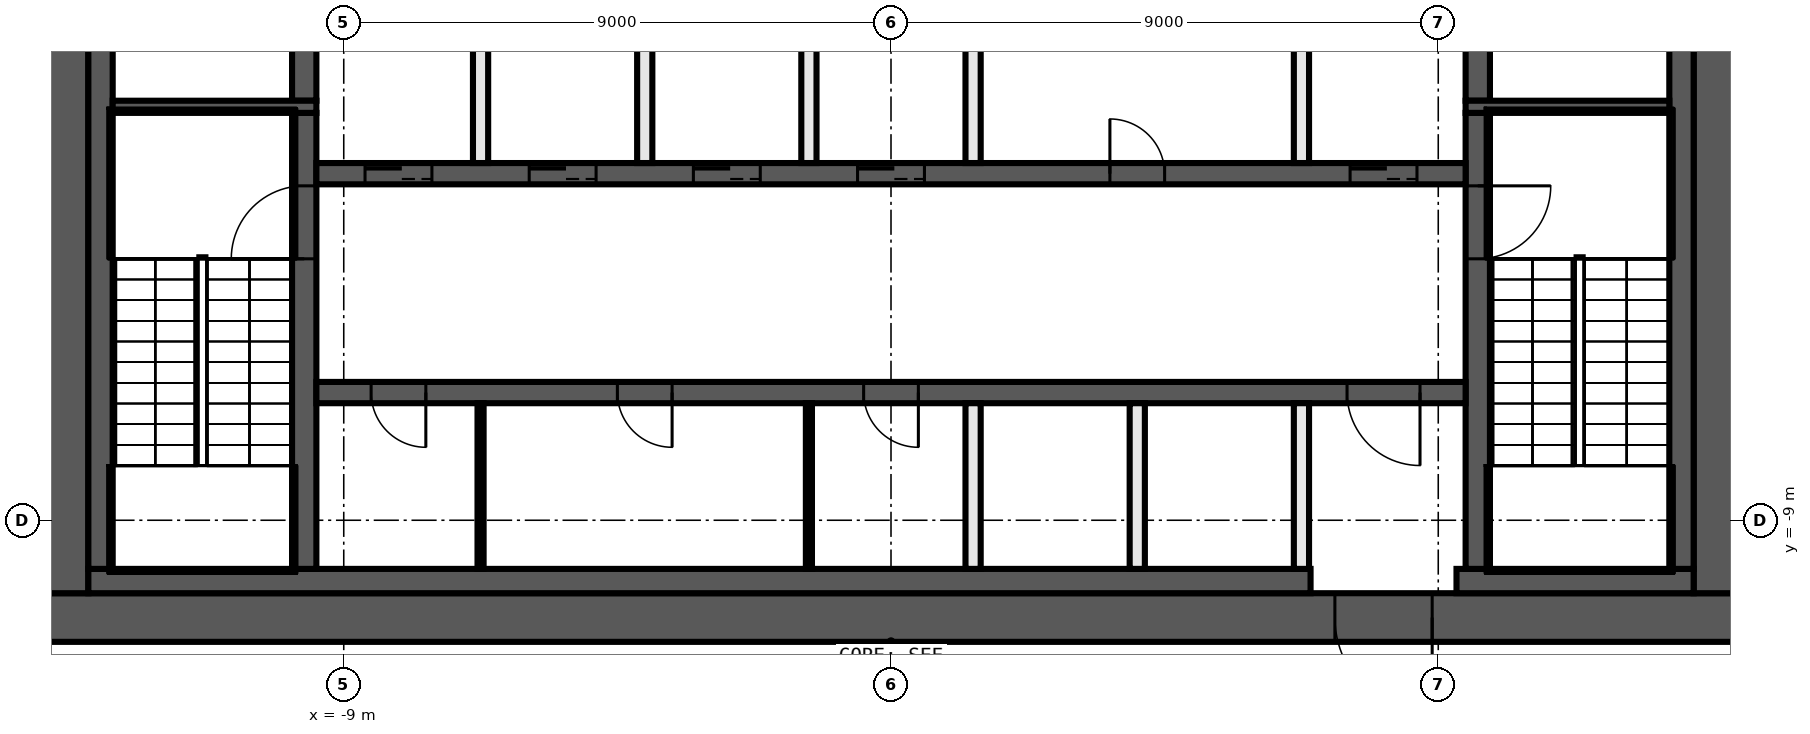
"""IFC4 building model, lengths in metres.
Left out: names, types, materials, properties, quantities, classifications, styles, units other than length and angle.
Written with IfcOpenShell. Run it as: python <this file> out.ifc"""

import sys

from ifc_helpers import new_model, si_unit, direction, frame, frame_2d, origin, place, context, subcontext, project, spatial, rectangle, extrude, element, fill, save


model = new_model("IFC4")
c1 = context("Model", 3, precision=1e-05, world=origin(), true_north=direction((0.0, 1.0)))
c2 = subcontext(c1, "Body", "Model", "MODEL_VIEW")
j1 = project(units=[si_unit("LENGTHUNIT", "METRE"), si_unit("PLANEANGLEUNIT", "RADIAN")], contexts=[c1])
p1 = place(None, origin())
s1 = spatial("IfcSite", under=j1, at=p1, CompositionType="ELEMENT")
p2 = place(p1, origin())
s2 = spatial("IfcBuilding", under=s1, at=p2, CompositionType="ELEMENT")
p3 = place(p2, frame((0.0, 0.0, 183.8)))
s3 = spatial("IfcBuildingStorey", under=s2, at=p3, CompositionType="ELEMENT", Elevation=183.8)
p4 = place(p3, frame((14.0, -10.6, 0.0), z_axis=(0.0, 0.0, 1.0), x_axis=(-1.0, 0.0, 0.0)))
e1 = element("IfcWall", 1, at=p4, inside=s3, PredefinedType="SHEAR", context=c2, shape_type="SweptSolid", body=[
    extrude(rectangle(XDim=28.0, YDim=0.8, at=frame_2d((14.0, 0.0))), origin(), (0.0, 0.0, 1.0), 14.62),
])
p5 = place(p4, frame((5.1, 0.0, 0.0)))
e2 = element("IfcOpeningElement", 2, at=p5, cuts=e1, PredefinedType="OPENING", context=c2, shape_type="SweptSolid", body=[
    extrude(rectangle(XDim=1.6, YDim=2.1, at=frame_2d((0.8, 1.05))), frame((0.0, 0.41, 0.0), z_axis=(0.0, -1.0, 0.0), x_axis=(1.0, 0.0, 0.0)), (0.0, 0.0, 1.0), 0.82),
])
for number, where, z_axis, x_axis in (
    (3, (13.6, 10.2, 0.0), (0.0, 0.0, 1.0), (0.0, -1.0, 0.0)),
    (4, (-13.6, -10.2, 0.0), (0.0, 0.0, 1.0), (0.0, 1.0, 0.0)),
):
    element("IfcWall", number, at=place(p3, frame(where, z_axis=z_axis, x_axis=x_axis)), inside=s3, PredefinedType="SHEAR", context=c2, shape_type="SweptSolid", body=[
        extrude(rectangle(XDim=20.4, YDim=0.8, at=frame_2d((10.2, 0.0))), origin(), (0.0, 0.0, 1.0), 14.62),
    ])
p6 = place(p3, frame((13.2, -10.0, 0.0), z_axis=(0.0, 0.0, 1.0), x_axis=(-1.0, 0.0, 0.0)))
e5 = element("IfcWall", 5, at=p6, inside=s3, PredefinedType="SHEAR", context=c2, shape_type="SweptSolid", body=[
    extrude(rectangle(XDim=3.9, YDim=0.4, at=frame_2d((1.95, 0.0))), origin(), (0.0, 0.0, 1.0), 14.62),
])
p7 = place(p3, frame((6.9, -10.0, 0.0), z_axis=(0.0, 0.0, 1.0), x_axis=(-1.0, 0.0, 0.0)))
e6 = element("IfcWall", 6, at=p7, inside=s3, PredefinedType="SHEAR", context=c2, shape_type="SweptSolid", body=[
    extrude(rectangle(XDim=20.1, YDim=0.4, at=frame_2d((10.05, 0.0))), origin(), (0.0, 0.0, 1.0), 14.62),
])
for number, where, z_axis, x_axis in (
    (7, (13.0, 9.8, 0.0), (0.0, 0.0, 1.0), (0.0, -1.0, 0.0)),
    (8, (-13.0, -9.8, 0.0), (0.0, 0.0, 1.0), (0.0, 1.0, 0.0)),
):
    element("IfcWall", number, at=place(p3, frame(where, z_axis=z_axis, x_axis=x_axis)), inside=s3, PredefinedType="SHEAR", context=c2, shape_type="SweptSolid", body=[
        extrude(rectangle(XDim=19.6, YDim=0.4, at=frame_2d((9.8, 0.0))), origin(), (0.0, 0.0, 1.0), 14.62),
    ])
p8 = place(p3, frame((9.65, -2.3, 0.0), z_axis=(0.0, 0.0, 1.0), x_axis=(0.0, -1.0, 0.0)))
e9 = element("IfcWall", 9, at=p8, inside=s3, PredefinedType="SHEAR", context=c2, shape_type="SweptSolid", body=[
    extrude(rectangle(XDim=7.5, YDim=0.4, at=frame_2d((3.75, 0.0))), origin(), (0.0, 0.0, 1.0), 14.62),
])
p9 = place(p8, frame((1.2, 0.0, 0.0)))
e10 = element("IfcOpeningElement", 10, at=p9, cuts=e9, PredefinedType="OPENING", context=c2, shape_type="SweptSolid", body=[
    extrude(rectangle(XDim=1.2, YDim=2.1, at=frame_2d((0.6, 1.05))), frame((0.0, 0.21, 0.0), z_axis=(0.0, -1.0, 0.0), x_axis=(1.0, 0.0, 0.0)), (0.0, 0.0, 1.0), 0.42),
])
p10 = place(p3, frame((9.65, 2.1, 0.0), z_axis=(0.0, 0.0, 1.0), x_axis=(0.0, -1.0, 0.0)))
e11 = element("IfcWall", 11, at=p10, inside=s3, PredefinedType="SHEAR", context=c2, shape_type="SweptSolid", body=[
    extrude(rectangle(XDim=4.2, YDim=0.4, at=frame_2d((2.1, 0.0))), origin(), (0.0, 0.0, 1.0), 14.62),
])
p11 = place(p10, frame((0.15, 0.0, 0.0)))
e12 = element("IfcOpeningElement", 12, at=p11, cuts=e11, PredefinedType="OPENING", context=c2, shape_type="SweptSolid", body=[
    extrude(rectangle(XDim=0.9, YDim=2.1, at=frame_2d((0.45, 1.05))), frame((0.0, 0.21, 0.0), z_axis=(0.0, -1.0, 0.0), x_axis=(1.0, 0.0, 0.0)), (0.0, 0.0, 1.0), 0.42),
])
p12 = place(p3, frame((-9.65, -9.8, 0.0), z_axis=(0.0, 0.0, 1.0), x_axis=(0.0, 1.0, 0.0)))
e13 = element("IfcWall", 13, at=p12, inside=s3, PredefinedType="SHEAR", context=c2, shape_type="SweptSolid", body=[
    extrude(rectangle(XDim=7.5, YDim=0.4, at=frame_2d((3.75, 0.0))), origin(), (0.0, 0.0, 1.0), 14.62),
])
p13 = place(p12, frame((5.1, 0.0, 0.0)))
e14 = element("IfcOpeningElement", 14, at=p13, cuts=e13, PredefinedType="OPENING", context=c2, shape_type="SweptSolid", body=[
    extrude(rectangle(XDim=1.2, YDim=2.1, at=frame_2d((0.6, 1.05))), frame((0.0, 0.21, 0.0), z_axis=(0.0, -1.0, 0.0), x_axis=(1.0, 0.0, 0.0)), (0.0, 0.0, 1.0), 0.42),
])
p14 = place(p3, frame((-9.65, -2.1, 0.0), z_axis=(0.0, 0.0, 1.0), x_axis=(0.0, 1.0, 0.0)))
e15 = element("IfcWall", 15, at=p14, inside=s3, PredefinedType="SHEAR", context=c2, shape_type="SweptSolid", body=[
    extrude(rectangle(XDim=4.2, YDim=0.4, at=frame_2d((2.1, 0.0))), origin(), (0.0, 0.0, 1.0), 14.62),
])
for number, where, z_axis, x_axis in (
    (16, (9.45, -2.2, 0.0), (0.0, 0.0, 1.0), (1.0, 0.0, 0.0)),
    (17, (-9.45, -2.2, 0.0), (0.0, 0.0, 1.0), (-1.0, 0.0, 0.0)),
):
    element("IfcWall", number, at=place(p3, frame(where, z_axis=z_axis, x_axis=x_axis)), inside=s3, PredefinedType="SHEAR", context=c2, shape_type="SweptSolid", body=[
        extrude(rectangle(XDim=3.35, YDim=0.2, at=frame_2d((1.675, 0.0))), origin(), (0.0, 0.0, 1.0), 14.62),
    ])
p15 = place(p3, frame((-9.45, -3.3, 0.0), z_axis=(0.0, 0.0, 1.0), x_axis=(1.0, 0.0, 0.0)))
e18 = element("IfcWall", 18, at=p15, inside=s3, PredefinedType="SHEAR", context=c2, shape_type="SweptSolid", body=[
    extrude(rectangle(XDim=18.9, YDim=0.35, at=frame_2d((9.45, 0.0))), origin(), (0.0, 0.0, 1.0), 14.62),
])
p16 = place(p15, frame((0.8, 0.0, 0.0)))
e19 = element("IfcOpeningElement", 19, at=p16, cuts=e18, PredefinedType="OPENING", context=c2, shape_type="SweptSolid", body=[
    extrude(rectangle(XDim=1.1, YDim=2.1, at=frame_2d((0.55, 1.05))), frame((0.0, 0.185, 0.0), z_axis=(0.0, -1.0, 0.0), x_axis=(1.0, 0.0, 0.0)), (0.0, 0.0, 1.0), 0.37),
])
p17 = place(p15, frame((3.5, 0.0, 0.0)))
e20 = element("IfcOpeningElement", 20, at=p17, cuts=e18, PredefinedType="OPENING", context=c2, shape_type="SweptSolid", body=[
    extrude(rectangle(XDim=1.1, YDim=2.1, at=frame_2d((0.55, 1.05))), frame((0.0, 0.185, 0.0), z_axis=(0.0, -1.0, 0.0), x_axis=(1.0, 0.0, 0.0)), (0.0, 0.0, 1.0), 0.37),
])
p18 = place(p15, frame((6.2, 0.0, 0.0)))
e21 = element("IfcOpeningElement", 21, at=p18, cuts=e18, PredefinedType="OPENING", context=c2, shape_type="SweptSolid", body=[
    extrude(rectangle(XDim=1.1, YDim=2.1, at=frame_2d((0.55, 1.05))), frame((0.0, 0.185, 0.0), z_axis=(0.0, -1.0, 0.0), x_axis=(1.0, 0.0, 0.0)), (0.0, 0.0, 1.0), 0.37),
])
p19 = place(p15, frame((8.9, 0.0, 0.0)))
e22 = element("IfcOpeningElement", 22, at=p19, cuts=e18, PredefinedType="OPENING", context=c2, shape_type="SweptSolid", body=[
    extrude(rectangle(XDim=1.1, YDim=2.1, at=frame_2d((0.55, 1.05))), frame((0.0, 0.185, 0.0), z_axis=(0.0, -1.0, 0.0), x_axis=(1.0, 0.0, 0.0)), (0.0, 0.0, 1.0), 0.37),
])
p20 = place(p15, frame((17.0, 0.0, 0.0)))
e23 = element("IfcOpeningElement", 23, at=p20, cuts=e18, PredefinedType="OPENING", context=c2, shape_type="SweptSolid", body=[
    extrude(rectangle(XDim=1.1, YDim=2.1, at=frame_2d((0.55, 1.05))), frame((0.0, 0.185, 0.0), z_axis=(0.0, -1.0, 0.0), x_axis=(1.0, 0.0, 0.0)), (0.0, 0.0, 1.0), 0.37),
])
p21 = place(p15, frame((13.05, 0.0, 0.0)))
e24 = element("IfcOpeningElement", 24, at=p21, cuts=e18, PredefinedType="OPENING", context=c2, shape_type="SweptSolid", body=[
    extrude(rectangle(XDim=0.9, YDim=2.1, at=frame_2d((0.45, 1.05))), frame((0.0, 0.185, 0.0), z_axis=(0.0, -1.0, 0.0), x_axis=(1.0, 0.0, 0.0)), (0.0, 0.0, 1.0), 0.37),
])
p22 = place(p3, frame((9.45, -6.9, 0.0), z_axis=(0.0, 0.0, 1.0), x_axis=(-1.0, 0.0, 0.0)))
e25 = element("IfcWall", 25, at=p22, inside=s3, PredefinedType="SHEAR", context=c2, shape_type="SweptSolid", body=[
    extrude(rectangle(XDim=18.9, YDim=0.35, at=frame_2d((9.45, 0.0))), origin(), (0.0, 0.0, 1.0), 14.62),
])
p23 = place(p22, frame((0.75, 0.0, 0.0)))
e26 = element("IfcOpeningElement", 26, at=p23, cuts=e25, PredefinedType="OPENING", context=c2, shape_type="SweptSolid", body=[
    extrude(rectangle(XDim=1.2, YDim=2.1, at=frame_2d((0.6, 1.05))), frame((0.0, 0.185, 0.0), z_axis=(0.0, -1.0, 0.0), x_axis=(1.0, 0.0, 0.0)), (0.0, 0.0, 1.0), 0.37),
])
p24 = place(p22, frame((17.1, 0.0, 0.0)))
e27 = element("IfcOpeningElement", 27, at=p24, cuts=e25, PredefinedType="OPENING", context=c2, shape_type="SweptSolid", body=[
    extrude(rectangle(XDim=0.9, YDim=2.1, at=frame_2d((0.45, 1.05))), frame((0.0, 0.185, 0.0), z_axis=(0.0, -1.0, 0.0), x_axis=(1.0, 0.0, 0.0)), (0.0, 0.0, 1.0), 0.37),
])
p25 = place(p22, frame((13.05, 0.0, 0.0)))
e28 = element("IfcOpeningElement", 28, at=p25, cuts=e25, PredefinedType="OPENING", context=c2, shape_type="SweptSolid", body=[
    extrude(rectangle(XDim=0.9, YDim=2.1, at=frame_2d((0.45, 1.05))), frame((0.0, 0.185, 0.0), z_axis=(0.0, -1.0, 0.0), x_axis=(1.0, 0.0, 0.0)), (0.0, 0.0, 1.0), 0.37),
])
p26 = place(p22, frame((9.0, 0.0, 0.0)))
e29 = element("IfcOpeningElement", 29, at=p26, cuts=e25, PredefinedType="OPENING", context=c2, shape_type="SweptSolid", body=[
    extrude(rectangle(XDim=0.9, YDim=2.1, at=frame_2d((0.45, 1.05))), frame((0.0, 0.185, 0.0), z_axis=(0.0, -1.0, 0.0), x_axis=(1.0, 0.0, 0.0)), (0.0, 0.0, 1.0), 0.37),
])
for number, where, z_axis, x_axis in (
    (30, (6.75, -9.8, 0.0), (0.0, 0.0, 1.0), (0.0, 1.0, 0.0)),
    (31, (6.75, -3.125, 0.0), (0.0, 0.0, 1.0), (0.0, 1.0, 0.0)),
    (32, (4.05, -9.8, 0.0), (0.0, 0.0, 1.0), (0.0, 1.0, 0.0)),
    (33, (1.35, -9.8, 0.0), (0.0, 0.0, 1.0), (0.0, 1.0, 0.0)),
    (34, (1.35, -3.125, 0.0), (0.0, 0.0, 1.0), (0.0, 1.0, 0.0)),
):
    element("IfcWall", number, at=place(p3, frame(where, z_axis=z_axis, x_axis=x_axis)), inside=s3, PredefinedType="SOLIDWALL", context=c2, shape_type="SweptSolid", body=[
        extrude(rectangle(XDim=2.725, YDim=0.25, at=frame_2d((1.363, 0.0))), origin(), (0.0, 0.0, 1.0), 14.62),
    ])
p27 = place(p3, frame((-1.35, -9.8, 0.0), z_axis=(0.0, 0.0, 1.0), x_axis=(0.0, 1.0, 0.0)))
e35 = element("IfcWall", 35, at=p27, inside=s3, PredefinedType="PARTITIONING", context=c2, shape_type="SweptSolid", body=[
    extrude(rectangle(XDim=2.725, YDim=0.1, at=frame_2d((1.363, 0.0))), origin(), (0.0, 0.0, 1.0), 14.62),
])
for number, where, z_axis, x_axis in (
    (36, (-1.35, -3.125, 0.0), (0.0, 0.0, 1.0), (0.0, 1.0, 0.0)),
    (37, (-4.05, -3.125, 0.0), (0.0, 0.0, 1.0), (0.0, 1.0, 0.0)),
):
    element("IfcWall", number, at=place(p3, frame(where, z_axis=z_axis, x_axis=x_axis)), inside=s3, PredefinedType="SOLIDWALL", context=c2, shape_type="SweptSolid", body=[
        extrude(rectangle(XDim=2.725, YDim=0.25, at=frame_2d((1.363, 0.0))), origin(), (0.0, 0.0, 1.0), 14.62),
    ])
p28 = place(p3, frame((-6.75, -9.8, 0.0), z_axis=(0.0, 0.0, 1.0), x_axis=(0.0, 1.0, 0.0)))
e38 = element("IfcWall", 38, at=p28, inside=s3, PredefinedType="PARTITIONING", context=c2, shape_type="SweptSolid", body=[
    extrude(rectangle(XDim=2.725, YDim=0.1, at=frame_2d((1.363, 0.0))), origin(), (0.0, 0.0, 1.0), 14.62),
])
p29 = place(p3, frame((-6.75, -3.125, 0.0), z_axis=(0.0, 0.0, 1.0), x_axis=(0.0, 1.0, 0.0)))
e39 = element("IfcWall", 39, at=p29, inside=s3, PredefinedType="SOLIDWALL", context=c2, shape_type="SweptSolid", body=[
    extrude(rectangle(XDim=2.725, YDim=0.25, at=frame_2d((1.363, 0.0))), origin(), (0.0, 0.0, 1.0), 14.62),
])
p30 = place(p16, origin())
e40 = element("IfcDoor", 40, at=p30, inside=s3, OperationType="DOUBLE_DOOR_SLIDING", PredefinedType="DOOR", context=c2, shape_type="SweptSolid", body=[
    extrude(rectangle(XDim=1.1, YDim=2.1, at=frame_2d((0.55, 1.05))), frame((0.0, 0.025, 0.0), z_axis=(0.0, -1.0, 0.0), x_axis=(1.0, 0.0, 0.0)), (0.0, 0.0, 1.0), 0.05),
])
fill(e19, e40)
p31 = place(p17, origin())
e41 = element("IfcDoor", 41, at=p31, inside=s3, OperationType="DOUBLE_DOOR_SLIDING", PredefinedType="DOOR", context=c2, shape_type="SweptSolid", body=[
    extrude(rectangle(XDim=1.1, YDim=2.1, at=frame_2d((0.55, 1.05))), frame((0.0, 0.025, 0.0), z_axis=(0.0, -1.0, 0.0), x_axis=(1.0, 0.0, 0.0)), (0.0, 0.0, 1.0), 0.05),
])
fill(e20, e41)
p32 = place(p18, origin())
e42 = element("IfcDoor", 42, at=p32, inside=s3, OperationType="DOUBLE_DOOR_SLIDING", PredefinedType="DOOR", context=c2, shape_type="SweptSolid", body=[
    extrude(rectangle(XDim=1.1, YDim=2.1, at=frame_2d((0.55, 1.05))), frame((0.0, 0.025, 0.0), z_axis=(0.0, -1.0, 0.0), x_axis=(1.0, 0.0, 0.0)), (0.0, 0.0, 1.0), 0.05),
])
fill(e21, e42)
p33 = place(p19, origin())
e43 = element("IfcDoor", 43, at=p33, inside=s3, OperationType="DOUBLE_DOOR_SLIDING", PredefinedType="DOOR", context=c2, shape_type="SweptSolid", body=[
    extrude(rectangle(XDim=1.1, YDim=2.1, at=frame_2d((0.55, 1.05))), frame((0.0, 0.025, 0.0), z_axis=(0.0, -1.0, 0.0), x_axis=(1.0, 0.0, 0.0)), (0.0, 0.0, 1.0), 0.05),
])
fill(e22, e43)
p34 = place(p20, origin())
e44 = element("IfcDoor", 44, at=p34, inside=s3, OperationType="DOUBLE_DOOR_SLIDING", PredefinedType="DOOR", context=c2, shape_type="SweptSolid", body=[
    extrude(rectangle(XDim=1.1, YDim=2.1, at=frame_2d((0.55, 1.05))), frame((0.0, 0.025, 0.0), z_axis=(0.0, -1.0, 0.0), x_axis=(1.0, 0.0, 0.0)), (0.0, 0.0, 1.0), 0.05),
])
fill(e23, e44)
p35 = place(p5, origin())
e45 = element("IfcDoor", 45, at=p35, inside=s3, OperationType="DOUBLE_DOOR_SINGLE_SWING", PredefinedType="DOOR", context=c2, shape_type="SweptSolid", body=[
    extrude(rectangle(XDim=1.6, YDim=2.1, at=frame_2d((0.8, 1.05))), frame((0.0, 0.025, 0.0), z_axis=(0.0, -1.0, 0.0), x_axis=(1.0, 0.0, 0.0)), (0.0, 0.0, 1.0), 0.05),
])
fill(e2, e45)
p36 = place(p23, origin())
e46 = element("IfcDoor", 46, at=p36, inside=s3, OperationType="SINGLE_SWING_LEFT", PredefinedType="DOOR", context=c2, shape_type="SweptSolid", body=[
    extrude(rectangle(XDim=1.2, YDim=2.1, at=frame_2d((0.6, 1.05))), frame((0.0, 0.025, 0.0), z_axis=(0.0, -1.0, 0.0), x_axis=(1.0, 0.0, 0.0)), (0.0, 0.0, 1.0), 0.05),
])
fill(e26, e46)
p37 = place(p21, origin())
e47 = element("IfcDoor", 47, at=p37, inside=s3, OperationType="SINGLE_SWING_LEFT", PredefinedType="DOOR", context=c2, shape_type="SweptSolid", body=[
    extrude(rectangle(XDim=0.9, YDim=2.1, at=frame_2d((0.45, 1.05))), frame((0.0, 0.025, 0.0), z_axis=(0.0, -1.0, 0.0), x_axis=(1.0, 0.0, 0.0)), (0.0, 0.0, 1.0), 0.05),
])
fill(e24, e47)
p38 = place(p24, origin())
e48 = element("IfcDoor", 48, at=p38, inside=s3, OperationType="SINGLE_SWING_RIGHT", PredefinedType="DOOR", context=c2, shape_type="SweptSolid", body=[
    extrude(rectangle(XDim=0.9, YDim=2.1, at=frame_2d((0.45, 1.05))), frame((0.0, 0.025, 0.0), z_axis=(0.0, -1.0, 0.0), x_axis=(1.0, 0.0, 0.0)), (0.0, 0.0, 1.0), 0.05),
])
fill(e27, e48)
p39 = place(p25, origin())
e49 = element("IfcDoor", 49, at=p39, inside=s3, OperationType="SINGLE_SWING_LEFT", PredefinedType="DOOR", context=c2, shape_type="SweptSolid", body=[
    extrude(rectangle(XDim=0.9, YDim=2.1, at=frame_2d((0.45, 1.05))), frame((0.0, 0.025, 0.0), z_axis=(0.0, -1.0, 0.0), x_axis=(1.0, 0.0, 0.0)), (0.0, 0.0, 1.0), 0.05),
])
fill(e28, e49)
p40 = place(p26, origin())
e50 = element("IfcDoor", 50, at=p40, inside=s3, OperationType="SINGLE_SWING_RIGHT", PredefinedType="DOOR", context=c2, shape_type="SweptSolid", body=[
    extrude(rectangle(XDim=0.9, YDim=2.1, at=frame_2d((0.45, 1.05))), frame((0.0, 0.025, 0.0), z_axis=(0.0, -1.0, 0.0), x_axis=(1.0, 0.0, 0.0)), (0.0, 0.0, 1.0), 0.05),
])
fill(e29, e50)
p41 = place(p9, origin())
e51 = element("IfcDoor", 51, at=p41, inside=s3, OperationType="SINGLE_SWING_RIGHT", PredefinedType="DOOR", context=c2, shape_type="SweptSolid", body=[
    extrude(rectangle(XDim=1.2, YDim=2.1, at=frame_2d((0.6, 1.05))), frame((0.0, 0.025, 0.0), z_axis=(0.0, -1.0, 0.0), x_axis=(1.0, 0.0, 0.0)), (0.0, 0.0, 1.0), 0.05),
])
fill(e10, e51)
p42 = place(p13, origin())
e52 = element("IfcDoor", 52, at=p42, inside=s3, OperationType="SINGLE_SWING_LEFT", PredefinedType="DOOR", context=c2, shape_type="SweptSolid", body=[
    extrude(rectangle(XDim=1.2, YDim=2.1, at=frame_2d((0.6, 1.05))), frame((0.0, 0.025, 0.0), z_axis=(0.0, -1.0, 0.0), x_axis=(1.0, 0.0, 0.0)), (0.0, 0.0, 1.0), 0.05),
])
fill(e14, e52)
save(model, sys.argv[1])
